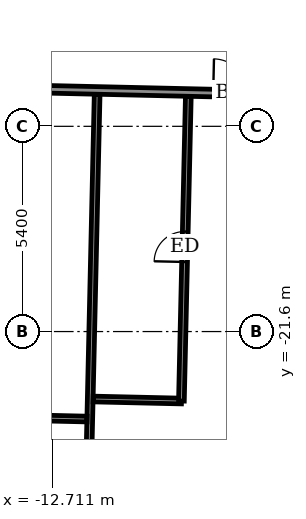
"""IFC4 building model, lengths in metres.
Left out: names, types, materials, properties, quantities, classifications, styles, units other than length and angle.
Written with IfcOpenShell. Run it as: python <this file> out.ifc"""

import sys

from ifc_helpers import new_model, si_unit, direction, frame, frame_2d, origin, place, context, subcontext, project, spatial, rectangle, extrude, element, fill, save


model = new_model("IFC4")
c1 = context("Model", 3, precision=1e-05, world=origin(), true_north=direction((0.0, 1.0)))
c2 = subcontext(c1, "Body", "Model", "MODEL_VIEW")
j1 = project(units=[si_unit("LENGTHUNIT", "METRE"), si_unit("PLANEANGLEUNIT", "RADIAN")], contexts=[c1])
p1 = place(None, origin())
s1 = spatial("IfcSite", under=j1, at=p1, CompositionType="ELEMENT")
p2 = place(p1, origin())
s2 = spatial("IfcBuilding", under=s1, at=p2, CompositionType="ELEMENT")
p3 = place(p2, frame((0.0, 0.0, 71.1)))
s3 = spatial("IfcBuildingStorey", under=s2, at=p3, CompositionType="ELEMENT", Elevation=71.1)
p4 = place(p3, frame((-11.809, -27.453, 0.0), z_axis=(0.0, 0.0, 1.0), x_axis=(0.02273928012, 0.99974142914, 0.0)))
e1 = element("IfcWall", 1, at=p4, inside=s3, PredefinedType="PARTITIONING", context=c2, shape_type="SweptSolid", body=[
    extrude(rectangle(XDim=12.1, YDim=0.15, at=frame_2d((6.05, 0.0))), origin(), (0.0, 0.0, 1.0), 2.55),
])
p5 = place(p3, frame((-14.126, -23.849, 0.0), z_axis=(0.0, 0.0, 1.0), x_axis=(0.999740478815, -0.022781023197, 0.0)))
e2 = element("IfcWall", 2, at=p5, inside=s3, PredefinedType="PARTITIONING", context=c2, shape_type="SweptSolid", body=[
    extrude(rectangle(XDim=2.325, YDim=0.15, at=frame_2d((1.163, 0.0))), origin(), (0.0, 0.0, 1.0), 3.05),
])
p6 = place(p3, frame((-11.639, -23.375, 0.0), z_axis=(0.0, 0.0, 1.0), x_axis=(0.999740260747, -0.02279059109, 0.0)))
e3 = element("IfcWall", 3, at=p6, inside=s3, PredefinedType="PARTITIONING", context=c2, shape_type="SweptSolid", body=[
    extrude(rectangle(XDim=2.324, YDim=0.15, at=frame_2d((1.162, 0.0))), origin(), (0.0, 0.0, 1.0), 3.05),
])
p7 = place(p3, frame((-9.317, -23.428, 0.0), z_axis=(0.0, 0.0, 1.0), x_axis=(0.022678533363, 0.999742808989, 0.0)))
e4 = element("IfcWall", 4, at=p7, inside=s3, PredefinedType="PARTITIONING", context=c2, shape_type="SweptSolid", body=[
    extrude(rectangle(XDim=8.02, YDim=0.15, at=frame_2d((4.01, 0.0))), origin(), (0.0, 0.0, 1.0), 3.05),
])
p8 = place(p7, frame((3.66, 0.0, 0.0)))
e5 = element("IfcOpeningElement", 5, at=p8, cuts=e4, PredefinedType="OPENING", context=c2, shape_type="SweptSolid", body=[
    extrude(rectangle(XDim=0.8, YDim=2.1, at=frame_2d((0.4, 1.05))), frame((0.0, 0.085, 0.0), z_axis=(0.0, -1.0, 0.0), x_axis=(1.0, 0.0, 0.0)), (0.0, 0.0, 1.0), 0.17),
])
p9 = place(p3, frame((-26.151, -14.924, 0.0), z_axis=(0.0, 0.0, 1.0), x_axis=(0.999742750999, -0.022681089575, 0.0)))
e6 = element("IfcWall", 6, at=p9, inside=s3, PredefinedType="PARTITIONING", context=c2, shape_type="SweptSolid", body=[
    extrude(rectangle(XDim=54.886, YDim=0.2, at=frame_2d((27.443, 0.0))), origin(), (0.0, 0.0, 1.0), 3.05),
])
p10 = place(p9, frame((1.345, 0.0, 0.0)))
e7 = element("IfcOpeningElement", 7, at=p10, cuts=e6, PredefinedType="OPENING", context=c2, shape_type="SweptSolid", body=[
    extrude(rectangle(XDim=1.0, YDim=2.1, at=frame_2d((0.5, 1.05))), frame((0.0, 0.11, 0.0), z_axis=(0.0, -1.0, 0.0), x_axis=(1.0, 0.0, 0.0)), (0.0, 0.0, 1.0), 0.22),
])
p11 = place(p9, frame((8.35, 0.0, 0.0)))
e8 = element("IfcOpeningElement", 8, at=p11, cuts=e6, PredefinedType="OPENING", context=c2, shape_type="SweptSolid", body=[
    extrude(rectangle(XDim=0.9, YDim=2.1, at=frame_2d((0.45, 1.05))), frame((0.0, 0.11, 0.0), z_axis=(0.0, -1.0, 0.0), x_axis=(1.0, 0.0, 0.0)), (0.0, 0.0, 1.0), 0.22),
])
p12 = place(p9, frame((10.625, 0.0, 0.0)))
e9 = element("IfcOpeningElement", 9, at=p12, cuts=e6, PredefinedType="OPENING", context=c2, shape_type="SweptSolid", body=[
    extrude(rectangle(XDim=0.9, YDim=2.1, at=frame_2d((0.45, 1.05))), frame((0.0, 0.11, 0.0), z_axis=(0.0, -1.0, 0.0), x_axis=(1.0, 0.0, 0.0)), (0.0, 0.0, 1.0), 0.22),
])
p13 = place(p9, frame((17.675, 0.0, 0.0)))
e10 = element("IfcOpeningElement", 10, at=p13, cuts=e6, PredefinedType="OPENING", context=c2, shape_type="SweptSolid", body=[
    extrude(rectangle(XDim=0.9, YDim=2.1, at=frame_2d((0.45, 1.05))), frame((0.0, 0.11, 0.0), z_axis=(0.0, -1.0, 0.0), x_axis=(1.0, 0.0, 0.0)), (0.0, 0.0, 1.0), 0.22),
])
p14 = place(p9, frame((19.725, 0.0, 0.0)))
e11 = element("IfcOpeningElement", 11, at=p14, cuts=e6, PredefinedType="OPENING", context=c2, shape_type="SweptSolid", body=[
    extrude(rectangle(XDim=0.9, YDim=2.1, at=frame_2d((0.45, 1.05))), frame((0.0, 0.11, 0.0), z_axis=(0.0, -1.0, 0.0), x_axis=(1.0, 0.0, 0.0)), (0.0, 0.0, 1.0), 0.22),
])
p15 = place(p9, frame((26.575, 0.0, 0.0)))
e12 = element("IfcOpeningElement", 12, at=p15, cuts=e6, PredefinedType="OPENING", context=c2, shape_type="SweptSolid", body=[
    extrude(rectangle(XDim=0.9, YDim=2.1, at=frame_2d((0.45, 1.05))), frame((0.0, 0.11, 0.0), z_axis=(0.0, -1.0, 0.0), x_axis=(1.0, 0.0, 0.0)), (0.0, 0.0, 1.0), 0.22),
])
p16 = place(p9, frame((28.75, 0.0, 0.0)))
e13 = element("IfcOpeningElement", 13, at=p16, cuts=e6, PredefinedType="OPENING", context=c2, shape_type="SweptSolid", body=[
    extrude(rectangle(XDim=0.9, YDim=2.1, at=frame_2d((0.45, 1.05))), frame((0.0, 0.11, 0.0), z_axis=(0.0, -1.0, 0.0), x_axis=(1.0, 0.0, 0.0)), (0.0, 0.0, 1.0), 0.22),
])
p17 = place(p9, frame((35.875, 0.0, 0.0)))
e14 = element("IfcOpeningElement", 14, at=p17, cuts=e6, PredefinedType="OPENING", context=c2, shape_type="SweptSolid", body=[
    extrude(rectangle(XDim=0.9, YDim=2.1, at=frame_2d((0.45, 1.05))), frame((0.0, 0.11, 0.0), z_axis=(0.0, -1.0, 0.0), x_axis=(1.0, 0.0, 0.0)), (0.0, 0.0, 1.0), 0.22),
])
p18 = place(p9, frame((38.1, 0.0, 0.0)))
e15 = element("IfcOpeningElement", 15, at=p18, cuts=e6, PredefinedType="OPENING", context=c2, shape_type="SweptSolid", body=[
    extrude(rectangle(XDim=0.9, YDim=2.1, at=frame_2d((0.45, 1.05))), frame((0.0, 0.11, 0.0), z_axis=(0.0, -1.0, 0.0), x_axis=(1.0, 0.0, 0.0)), (0.0, 0.0, 1.0), 0.22),
])
p19 = place(p9, frame((45.125, 0.0, 0.0)))
e16 = element("IfcOpeningElement", 16, at=p19, cuts=e6, PredefinedType="OPENING", context=c2, shape_type="SweptSolid", body=[
    extrude(rectangle(XDim=0.9, YDim=2.1, at=frame_2d((0.45, 1.05))), frame((0.0, 0.11, 0.0), z_axis=(0.0, -1.0, 0.0), x_axis=(1.0, 0.0, 0.0)), (0.0, 0.0, 1.0), 0.22),
])
p20 = place(p9, frame((52.618, 0.0, 0.0)))
e17 = element("IfcOpeningElement", 17, at=p20, cuts=e6, PredefinedType="OPENING", context=c2, shape_type="SweptSolid", body=[
    extrude(rectangle(XDim=1.0, YDim=2.1, at=frame_2d((0.5, 1.05))), frame((0.0, 0.11, 0.0), z_axis=(0.0, -1.0, 0.0), x_axis=(1.0, 0.0, 0.0)), (0.0, 0.0, 1.0), 0.22),
])
p21 = place(p9, frame((47.575, 0.0, 0.0)))
e18 = element("IfcOpeningElement", 18, at=p21, cuts=e6, PredefinedType="OPENING", context=c2, shape_type="SweptSolid", body=[
    extrude(rectangle(XDim=0.9, YDim=2.1, at=frame_2d((0.45, 1.05))), frame((0.0, 0.11, 0.0), z_axis=(0.0, -1.0, 0.0), x_axis=(1.0, 0.0, 0.0)), (0.0, 0.0, 1.0), 0.22),
])
p22 = place(p13, origin())
e19 = element("IfcDoor", 19, at=p22, inside=s3, OperationType="SINGLE_SWING_LEFT", PredefinedType="DOOR", context=c2, shape_type="SweptSolid", body=[
    extrude(rectangle(XDim=0.9, YDim=2.1, at=frame_2d((0.45, 1.05))), frame((0.0, 0.025, 0.0), z_axis=(0.0, -1.0, 0.0), x_axis=(1.0, 0.0, 0.0)), (0.0, 0.0, 1.0), 0.05),
])
fill(e10, e19)
p23 = place(p8, origin())
e20 = element("IfcDoor", 20, at=p23, inside=s3, OperationType="SINGLE_SWING_LEFT", PredefinedType="DOOR", context=c2, shape_type="SweptSolid", body=[
    extrude(rectangle(XDim=0.8, YDim=2.1, at=frame_2d((0.4, 1.05))), frame((0.0, 0.025, 0.0), z_axis=(0.0, -1.0, 0.0), x_axis=(1.0, 0.0, 0.0)), (0.0, 0.0, 1.0), 0.05),
])
fill(e5, e20)
save(model, sys.argv[1])
